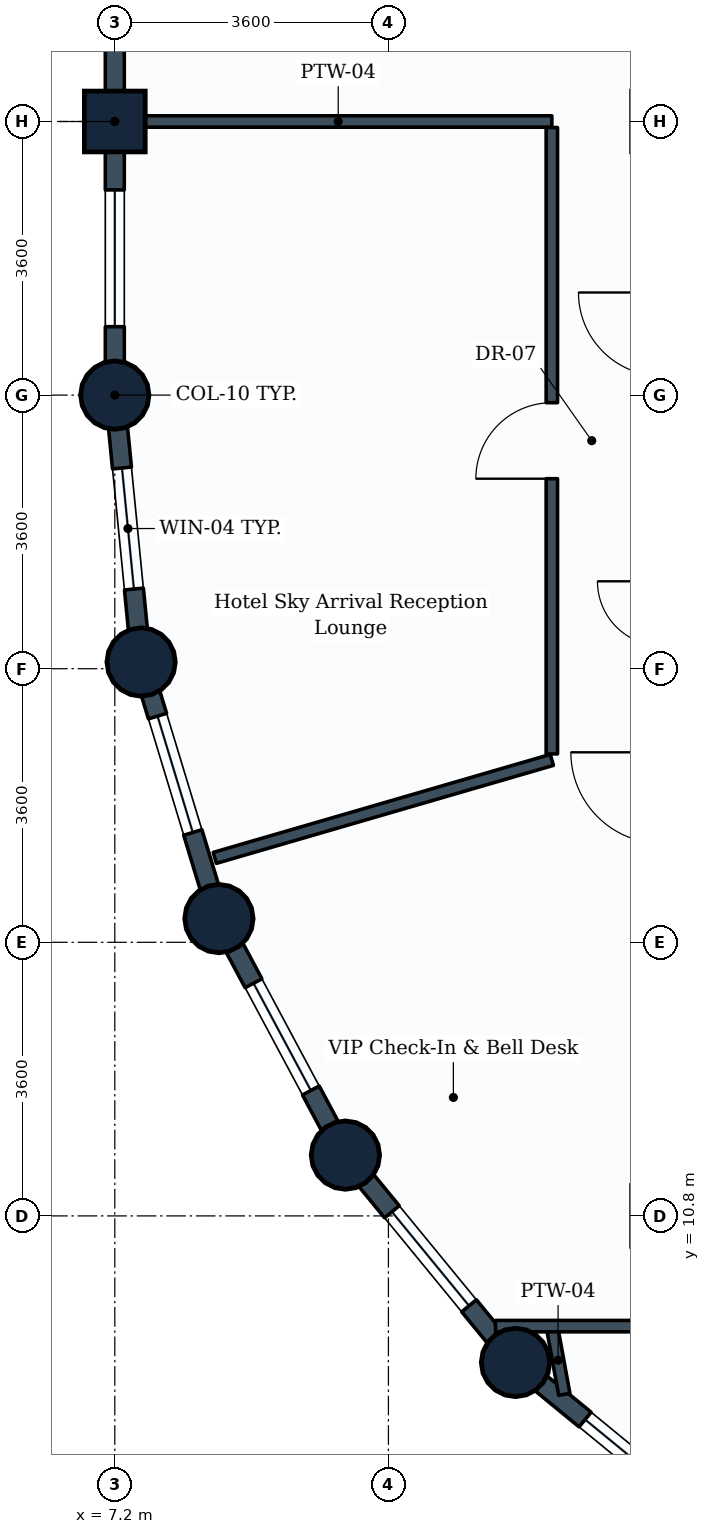
"""IFC4 building model, lengths in metres.
Left out: names, types, materials, properties, quantities, classifications, styles, units other than length and angle.
Written with IfcOpenShell. Run it as: python <this file> out.ifc"""

import sys

from ifc_helpers import new_model, si_unit, direction, frame, frame_2d, origin, origin_2d, place, context, subcontext, project, spatial, rectangle, circle, extrude, element, fill, save


model = new_model("IFC4")
c1 = context("Model", 3, precision=1e-05, world=origin(), true_north=direction((0.0, 1.0)))
c2 = subcontext(c1, "Body", "Model", "MODEL_VIEW")
j1 = project(units=[si_unit("LENGTHUNIT", "METRE"), si_unit("PLANEANGLEUNIT", "RADIAN")], contexts=[c1])
p1 = place(None, origin())
s1 = spatial("IfcSite", under=j1, at=p1, CompositionType="ELEMENT")
p2 = place(p1, origin())
s2 = spatial("IfcBuilding", under=s1, at=p2, CompositionType="ELEMENT")
p3 = place(p2, frame((0.0, 0.0, 221.0)))
s3 = spatial("IfcBuildingStorey", under=s2, at=p3, CompositionType="ELEMENT", Elevation=221.0)
p4 = place(p3, frame((7.2, 21.6, 0.0), z_axis=(0.0, 0.0, 1.0), x_axis=(1.0, 0.0, 0.0)))
e1 = element("IfcColumn", 1, at=p4, inside=s3, PredefinedType="COLUMN", context=c2, shape_type="SweptSolid", body=[
    extrude(circle(Radius=0.45, at=origin_2d()), origin(), (0.0, 0.0, 1.0), 3.6),
])
p5 = place(p3, frame((7.2, 25.2, 0.0), z_axis=(0.0, 0.0, 1.0), x_axis=(0.0, 1.0, 0.0)))
e2 = element("IfcColumn", 2, at=p5, inside=s3, PredefinedType="COLUMN", context=c2, shape_type="SweptSolid", body=[
    extrude(rectangle(XDim=0.8, YDim=0.8, at=origin_2d()), origin(), (0.0, 0.0, 1.0), 3.6),
])
for number, where, z_axis, x_axis in (
    (3, (7.546, 18.088, 0.0), (0.0, 0.0, 1.0), (1.0, 0.0, 0.0)),
    (4, (8.57, 14.712, 0.0), (0.0, 0.0, 1.0), (1.0, 0.0, 0.0)),
    (5, (10.234, 11.6, 0.0), (0.0, 0.0, 1.0), (1.0, 0.0, 0.0)),
    (6, (12.472, 8.872, 0.0), (0.0, 0.0, 1.0), (1.0, 0.0, 0.0)),
):
    element("IfcColumn", number, at=place(p3, frame(where, z_axis=z_axis, x_axis=x_axis)), inside=s3, PredefinedType="COLUMN", context=c2, shape_type="SweptSolid", body=[
        extrude(circle(Radius=0.45, at=origin_2d()), origin(), (0.0, 0.0, 1.0), 3.6),
    ])
p6 = place(p3, frame((7.2, 25.2, 0.0), z_axis=(0.0, 0.0, 1.0), x_axis=(0.0, 1.0, 0.0)))
e7 = element("IfcWall", 7, at=p6, inside=s3, PredefinedType="STANDARD", context=c2, shape_type="SweptSolid", body=[
    extrude(rectangle(XDim=3.6, YDim=0.25, at=frame_2d((1.8, 0.0))), origin(), (0.0, 0.0, 1.0), 2.83),
])
p7 = place(p3, frame((7.2, 21.6, 0.0), z_axis=(0.0, 0.0, 1.0), x_axis=(0.0, 1.0, 0.0)))
e8 = element("IfcWall", 8, at=p7, inside=s3, PredefinedType="STANDARD", context=c2, shape_type="SweptSolid", body=[
    extrude(rectangle(XDim=3.6, YDim=0.25, at=frame_2d((1.8, 0.0))), origin(), (0.0, 0.0, 1.0), 2.83),
])
p8 = place(p7, frame((0.9, 0.0, 0.85)))
e9 = element("IfcOpeningElement", 9, at=p8, cuts=e8, PredefinedType="OPENING", context=c2, shape_type="SweptSolid", body=[
    extrude(rectangle(XDim=1.8, YDim=1.35, at=frame_2d((0.9, 0.675))), frame((0.0, 0.135, 0.0), z_axis=(0.0, -1.0, 0.0), x_axis=(1.0, 0.0, 0.0)), (0.0, 0.0, 1.0), 0.27),
])
p9 = place(p3, frame((7.546, 18.088, 0.0), z_axis=(0.0, 0.0, 1.0), x_axis=(-0.09802417461, 0.995184033831, 0.0)))
e10 = element("IfcWall", 10, at=p9, inside=s3, PredefinedType="STANDARD", context=c2, shape_type="SweptSolid", body=[
    extrude(rectangle(XDim=3.529, YDim=0.25, at=frame_2d((1.765, 0.0))), origin(), (0.0, 0.0, 1.0), 2.83),
])
p10 = place(p9, frame((0.965, 0.0, 0.85)))
e11 = element("IfcOpeningElement", 11, at=p10, cuts=e10, PredefinedType="OPENING", context=c2, shape_type="SweptSolid", body=[
    extrude(rectangle(XDim=1.6, YDim=1.35, at=frame_2d((0.8, 0.675))), frame((0.0, 0.135, 0.0), z_axis=(0.0, -1.0, 0.0), x_axis=(1.0, 0.0, 0.0)), (0.0, 0.0, 1.0), 0.27),
])
p11 = place(p3, frame((8.57, 14.712, 0.0), z_axis=(0.0, 0.0, 1.0), x_axis=(-0.290305086481, 0.956934144423, 0.0)))
e12 = element("IfcWall", 12, at=p11, inside=s3, PredefinedType="STANDARD", context=c2, shape_type="SweptSolid", body=[
    extrude(rectangle(XDim=3.528, YDim=0.25, at=frame_2d((1.764, 0.0))), origin(), (0.0, 0.0, 1.0), 2.83),
])
p12 = place(p11, frame((1.184, 0.0, 0.85)))
e13 = element("IfcOpeningElement", 13, at=p12, cuts=e12, PredefinedType="OPENING", context=c2, shape_type="SweptSolid", body=[
    extrude(rectangle(XDim=1.6, YDim=1.35, at=frame_2d((0.8, 0.675))), frame((0.0, 0.135, 0.0), z_axis=(0.0, -1.0, 0.0), x_axis=(1.0, 0.0, 0.0)), (0.0, 0.0, 1.0), 0.27),
])
p13 = place(p3, frame((10.234, 11.6, 0.0), z_axis=(0.0, 0.0, 1.0), x_axis=(-0.47151087309, 0.881860247748, 0.0)))
e14 = element("IfcWall", 14, at=p13, inside=s3, PredefinedType="STANDARD", context=c2, shape_type="SweptSolid", body=[
    extrude(rectangle(XDim=3.529, YDim=0.25, at=frame_2d((1.764, 0.0))), origin(), (0.0, 0.0, 1.0), 2.83),
])
p14 = place(p13, frame((0.964, 0.0, 0.85)))
e15 = element("IfcOpeningElement", 15, at=p14, cuts=e14, PredefinedType="OPENING", context=c2, shape_type="SweptSolid", body=[
    extrude(rectangle(XDim=1.6, YDim=1.35, at=frame_2d((0.8, 0.675))), frame((0.0, 0.135, 0.0), z_axis=(0.0, -1.0, 0.0), x_axis=(1.0, 0.0, 0.0)), (0.0, 0.0, 1.0), 0.27),
])
p15 = place(p3, frame((12.472, 8.872, 0.0), z_axis=(0.0, 0.0, 1.0), x_axis=(-0.634258295121, 0.773121216285, 0.0)))
e16 = element("IfcWall", 16, at=p15, inside=s3, PredefinedType="STANDARD", context=c2, shape_type="SweptSolid", body=[
    extrude(rectangle(XDim=3.529, YDim=0.25, at=frame_2d((1.764, 0.0))), origin(), (0.0, 0.0, 1.0), 2.83),
])
p16 = place(p15, frame((0.964, 0.0, 0.85)))
e17 = element("IfcOpeningElement", 17, at=p16, cuts=e16, PredefinedType="OPENING", context=c2, shape_type="SweptSolid", body=[
    extrude(rectangle(XDim=1.6, YDim=1.35, at=frame_2d((0.8, 0.675))), frame((0.0, 0.135, 0.0), z_axis=(0.0, -1.0, 0.0), x_axis=(1.0, 0.0, 0.0)), (0.0, 0.0, 1.0), 0.27),
])
p17 = place(p3, frame((15.2, 6.634, 0.0), z_axis=(0.0, 0.0, 1.0), x_axis=(-0.773121216285, 0.634258295121, 0.0)))
e18 = element("IfcWall", 18, at=p17, inside=s3, PredefinedType="STANDARD", context=c2, shape_type="SweptSolid", body=[
    extrude(rectangle(XDim=3.529, YDim=0.25, at=frame_2d((1.764, 0.0))), origin(), (0.0, 0.0, 1.0), 2.83),
])
p18 = place(p17, frame((0.744, 0.0, 0.85)))
e19 = element("IfcOpeningElement", 19, at=p18, cuts=e18, PredefinedType="OPENING", context=c2, shape_type="SweptSolid", body=[
    extrude(rectangle(XDim=1.6, YDim=1.35, at=frame_2d((0.8, 0.675))), frame((0.0, 0.135, 0.0), z_axis=(0.0, -1.0, 0.0), x_axis=(1.0, 0.0, 0.0)), (0.0, 0.0, 1.0), 0.27),
])
p19 = place(p3, frame((7.329, 25.2, 0.0), z_axis=(0.0, 0.0, 1.0), x_axis=(1.0, 0.0, 0.0)))
e20 = element("IfcWall", 20, at=p19, inside=s3, PredefinedType="PARTITIONING", context=c2, shape_type="SweptSolid", body=[
    extrude(rectangle(XDim=5.621, YDim=0.15, at=frame_2d((2.811, 0.0))), origin(), (0.0, 0.0, 1.0), 3.335),
])
p20 = place(p3, frame((12.95, 16.8, 0.0), z_axis=(0.0, 0.0, 1.0), x_axis=(-0.960230611001, -0.279208118968, 0.0)))
e21 = element("IfcWall", 21, at=p20, inside=s3, PredefinedType="PARTITIONING", context=c2, shape_type="SweptSolid", body=[
    extrude(rectangle(XDim=4.618, YDim=0.15, at=frame_2d((2.309, 0.0))), origin(), (0.0, 0.0, 1.0), 2.83),
])
p21 = place(p3, frame((12.95, 9.35, 0.0), z_axis=(0.0, 0.0, 1.0), x_axis=(0.179827308786, -0.983698195086, 0.0)))
e22 = element("IfcWall", 22, at=p21, inside=s3, PredefinedType="PARTITIONING", context=c2, shape_type="SweptSolid", body=[
    extrude(rectangle(XDim=0.912, YDim=0.15, at=frame_2d((0.456, 0.0))), origin(), (0.0, 0.0, 1.0), 2.83),
])
p22 = place(p3, frame((12.95, 16.879, 0.0), z_axis=(0.0, 0.0, 1.0), x_axis=(0.0, 1.0, 0.0)))
e23 = element("IfcWall", 23, at=p22, inside=s3, PredefinedType="PARTITIONING", context=c2, shape_type="SweptSolid", body=[
    extrude(rectangle(XDim=8.242, YDim=0.15, at=frame_2d((4.121, 0.0))), origin(), (0.0, 0.0, 1.0), 3.02),
])
p23 = place(p22, frame((3.621, 0.0, 0.0)))
e24 = element("IfcOpeningElement", 24, at=p23, cuts=e23, PredefinedType="OPENING", context=c2, shape_type="SweptSolid", body=[
    extrude(rectangle(XDim=1.0, YDim=2.1, at=frame_2d((0.5, 1.05))), frame((0.0, 0.085, 0.0), z_axis=(0.0, -1.0, 0.0), x_axis=(1.0, 0.0, 0.0)), (0.0, 0.0, 1.0), 0.17),
])
p24 = place(p3, frame((12.209, 9.35, 0.0), z_axis=(0.0, 0.0, 1.0), x_axis=(1.0, 0.0, 0.0)))
e25 = element("IfcWall", 25, at=p24, inside=s3, PredefinedType="PARTITIONING", context=c2, shape_type="SweptSolid", body=[
    extrude(rectangle(XDim=8.112, YDim=0.15, at=frame_2d((4.056, 0.0))), origin(), (0.0, 0.0, 1.0), 2.83),
])
p25 = place(p24, frame((5.002, 0.0, 0.0)))
e26 = element("IfcOpeningElement", 26, at=p25, cuts=e25, PredefinedType="OPENING", context=c2, shape_type="SweptSolid", body=[
    extrude(rectangle(XDim=1.0, YDim=2.1, at=frame_2d((0.5, 1.05))), frame((0.0, 0.085, 0.0), z_axis=(0.0, -1.0, 0.0), x_axis=(1.0, 0.0, 0.0)), (0.0, 0.0, 1.0), 0.17),
])
p26 = place(p8, origin())
e27 = element("IfcWindow", 27, at=p26, inside=s3, PartitioningType="SINGLE_PANEL", PredefinedType="WINDOW", context=c2, shape_type="SweptSolid", body=[
    extrude(rectangle(XDim=1.8, YDim=1.35, at=frame_2d((0.9, 0.675))), frame((0.0, 0.03, 0.0), z_axis=(0.0, -1.0, 0.0), x_axis=(1.0, 0.0, 0.0)), (0.0, 0.0, 1.0), 0.06),
])
fill(e9, e27)
p27 = place(p10, origin())
e28 = element("IfcWindow", 28, at=p27, inside=s3, PartitioningType="SINGLE_PANEL", PredefinedType="WINDOW", context=c2, shape_type="SweptSolid", body=[
    extrude(rectangle(XDim=1.6, YDim=1.35, at=frame_2d((0.8, 0.675))), frame((0.0, 0.03, 0.0), z_axis=(0.0, -1.0, 0.0), x_axis=(1.0, 0.0, 0.0)), (0.0, 0.0, 1.0), 0.06),
])
fill(e11, e28)
p28 = place(p12, origin())
e29 = element("IfcWindow", 29, at=p28, inside=s3, PartitioningType="SINGLE_PANEL", PredefinedType="WINDOW", context=c2, shape_type="SweptSolid", body=[
    extrude(rectangle(XDim=1.6, YDim=1.35, at=frame_2d((0.8, 0.675))), frame((0.0, 0.03, 0.0), z_axis=(0.0, -1.0, 0.0), x_axis=(1.0, 0.0, 0.0)), (0.0, 0.0, 1.0), 0.06),
])
fill(e13, e29)
p29 = place(p14, origin())
e30 = element("IfcWindow", 30, at=p29, inside=s3, PartitioningType="SINGLE_PANEL", PredefinedType="WINDOW", context=c2, shape_type="SweptSolid", body=[
    extrude(rectangle(XDim=1.6, YDim=1.35, at=frame_2d((0.8, 0.675))), frame((0.0, 0.03, 0.0), z_axis=(0.0, -1.0, 0.0), x_axis=(1.0, 0.0, 0.0)), (0.0, 0.0, 1.0), 0.06),
])
fill(e15, e30)
p30 = place(p16, origin())
e31 = element("IfcWindow", 31, at=p30, inside=s3, PartitioningType="SINGLE_PANEL", PredefinedType="WINDOW", context=c2, shape_type="SweptSolid", body=[
    extrude(rectangle(XDim=1.6, YDim=1.35, at=frame_2d((0.8, 0.675))), frame((0.0, 0.03, 0.0), z_axis=(0.0, -1.0, 0.0), x_axis=(1.0, 0.0, 0.0)), (0.0, 0.0, 1.0), 0.06),
])
fill(e17, e31)
p31 = place(p18, origin())
e32 = element("IfcWindow", 32, at=p31, inside=s3, PartitioningType="SINGLE_PANEL", PredefinedType="WINDOW", context=c2, shape_type="SweptSolid", body=[
    extrude(rectangle(XDim=1.6, YDim=1.35, at=frame_2d((0.8, 0.675))), frame((0.0, 0.03, 0.0), z_axis=(0.0, -1.0, 0.0), x_axis=(1.0, 0.0, 0.0)), (0.0, 0.0, 1.0), 0.06),
])
fill(e19, e32)
p32 = place(p23, origin())
e33 = element("IfcDoor", 33, at=p32, inside=s3, OperationType="SINGLE_SWING_LEFT", PredefinedType="DOOR", context=c2, shape_type="SweptSolid", body=[
    extrude(rectangle(XDim=1.0, YDim=2.1, at=frame_2d((0.5, 1.05))), frame((0.0, 0.025, 0.0), z_axis=(0.0, -1.0, 0.0), x_axis=(1.0, 0.0, 0.0)), (0.0, 0.0, 1.0), 0.05),
])
fill(e24, e33)
save(model, sys.argv[1])
